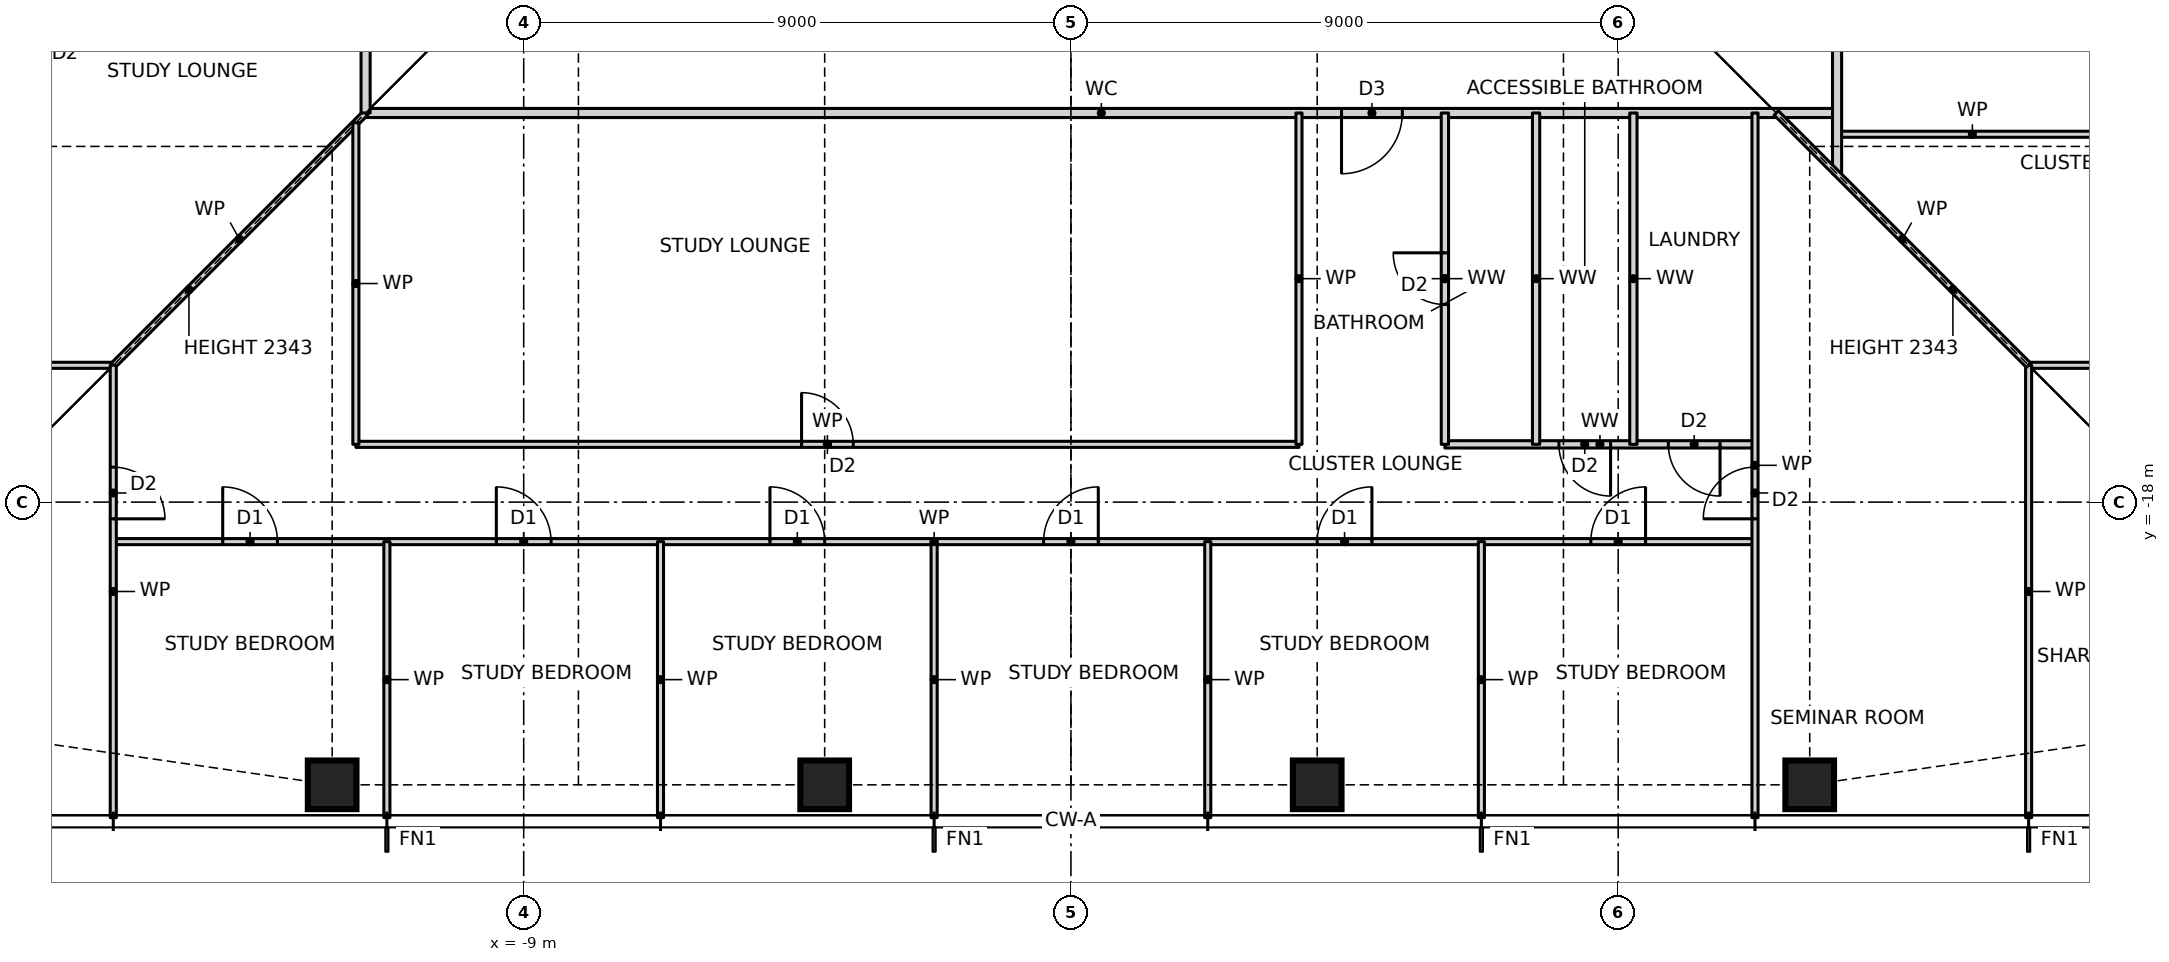
"""IFC4 building model, lengths in metres.
Left out: names, types, materials, properties, quantities, classifications, styles, units other than length and angle.
Written with IfcOpenShell. Run it as: python <this file> out.ifc"""

import sys

from ifc_helpers import new_model, si_unit, direction, frame, frame_2d, origin, origin_2d, place, context, subcontext, project, spatial, rectangle, hollow_rectangle, extrude, element, fill, save


model = new_model("IFC4")
c1 = context("Model", 3, precision=1e-05, world=origin(), true_north=direction((0.0, 1.0)))
c2 = subcontext(c1, "Body", "Model", "MODEL_VIEW")
j1 = project(units=[si_unit("LENGTHUNIT", "METRE"), si_unit("PLANEANGLEUNIT", "RADIAN")], contexts=[c1])
p1 = place(None, origin())
s1 = spatial("IfcSite", under=j1, at=p1, CompositionType="ELEMENT")
p2 = place(p1, origin())
s2 = spatial("IfcBuilding", under=s1, at=p2, CompositionType="ELEMENT")
p3 = place(p2, frame((0.0, 0.0, 29.0)))
s3 = spatial("IfcBuildingStorey", under=s2, at=p3, CompositionType="ELEMENT", Elevation=29.0)
for number, where, z_axis, x_axis in (
    (1, (-12.15, -22.65, 0.0), (0.0, 0.0, 1.0), (1.0, 0.0, 0.0)),
    (2, (-4.05, -22.65, 0.0), (0.0, 0.0, 1.0), (1.0, 0.0, 0.0)),
    (3, (4.05, -22.65, 0.0), (0.0, 0.0, 1.0), (1.0, 0.0, 0.0)),
    (4, (12.15, -22.65, 0.0), (0.0, 0.0, 1.0), (1.0, 0.0, 0.0)),
):
    element("IfcColumn", number, at=place(p3, frame(where, z_axis=z_axis, x_axis=x_axis)), inside=s3, PredefinedType="COLUMN", context=c2, shape_type="SweptSolid", body=[
        extrude(hollow_rectangle(XDim=0.8, YDim=0.8, WallThickness=0.09, at=origin_2d()), origin(), (0.0, 0.0, 1.0), 3.5),
    ])
p4 = place(p3, frame((-15.75, -18.65, 0.0), z_axis=(0.0, 0.0, 1.0), x_axis=(1.0, 0.0, 0.0)))
e5 = element("IfcWall", 5, at=p4, inside=s3, PredefinedType="PARTITIONING", context=c2, shape_type="SweptSolid", body=[
    extrude(rectangle(XDim=27.0, YDim=0.1, at=frame_2d((13.5, 0.0))), origin(), (0.0, 0.0, 1.0), 3.27),
])
p5 = place(p4, frame((1.8, 0.0, 0.0)))
e6 = element("IfcOpeningElement", 6, at=p5, cuts=e5, PredefinedType="OPENING", context=c2, shape_type="SweptSolid", body=[
    extrude(rectangle(XDim=0.9, YDim=2.1, at=frame_2d((0.45, 1.05))), frame((0.0, 0.06, 0.0), z_axis=(0.0, -1.0, 0.0), x_axis=(1.0, 0.0, 0.0)), (0.0, 0.0, 1.0), 0.12),
])
p6 = place(p4, frame((6.3, 0.0, 0.0)))
e7 = element("IfcOpeningElement", 7, at=p6, cuts=e5, PredefinedType="OPENING", context=c2, shape_type="SweptSolid", body=[
    extrude(rectangle(XDim=0.9, YDim=2.1, at=frame_2d((0.45, 1.05))), frame((0.0, 0.06, 0.0), z_axis=(0.0, -1.0, 0.0), x_axis=(1.0, 0.0, 0.0)), (0.0, 0.0, 1.0), 0.12),
])
p7 = place(p4, frame((10.8, 0.0, 0.0)))
e8 = element("IfcOpeningElement", 8, at=p7, cuts=e5, PredefinedType="OPENING", context=c2, shape_type="SweptSolid", body=[
    extrude(rectangle(XDim=0.9, YDim=2.1, at=frame_2d((0.45, 1.05))), frame((0.0, 0.06, 0.0), z_axis=(0.0, -1.0, 0.0), x_axis=(1.0, 0.0, 0.0)), (0.0, 0.0, 1.0), 0.12),
])
p8 = place(p4, frame((15.3, 0.0, 0.0)))
e9 = element("IfcOpeningElement", 9, at=p8, cuts=e5, PredefinedType="OPENING", context=c2, shape_type="SweptSolid", body=[
    extrude(rectangle(XDim=0.9, YDim=2.1, at=frame_2d((0.45, 1.05))), frame((0.0, 0.06, 0.0), z_axis=(0.0, -1.0, 0.0), x_axis=(1.0, 0.0, 0.0)), (0.0, 0.0, 1.0), 0.12),
])
p9 = place(p4, frame((19.8, 0.0, 0.0)))
e10 = element("IfcOpeningElement", 10, at=p9, cuts=e5, PredefinedType="OPENING", context=c2, shape_type="SweptSolid", body=[
    extrude(rectangle(XDim=0.9, YDim=2.1, at=frame_2d((0.45, 1.05))), frame((0.0, 0.06, 0.0), z_axis=(0.0, -1.0, 0.0), x_axis=(1.0, 0.0, 0.0)), (0.0, 0.0, 1.0), 0.12),
])
p10 = place(p4, frame((24.3, 0.0, 0.0)))
e11 = element("IfcOpeningElement", 11, at=p10, cuts=e5, PredefinedType="OPENING", context=c2, shape_type="SweptSolid", body=[
    extrude(rectangle(XDim=0.9, YDim=2.1, at=frame_2d((0.45, 1.05))), frame((0.0, 0.06, 0.0), z_axis=(0.0, -1.0, 0.0), x_axis=(1.0, 0.0, 0.0)), (0.0, 0.0, 1.0), 0.12),
])
p11 = place(p3, frame((-11.76, -17.05, 0.0), z_axis=(0.0, 0.0, 1.0), x_axis=(1.0, 0.0, 0.0)))
e12 = element("IfcWall", 12, at=p11, inside=s3, PredefinedType="PARTITIONING", context=c2, shape_type="SweptSolid", body=[
    extrude(rectangle(XDim=15.51, YDim=0.1, at=frame_2d((7.755, 0.0))), origin(), (0.0, 0.0, 1.0), 3.27),
])
p12 = place(p11, frame((7.33, 0.0, 0.0)))
e13 = element("IfcOpeningElement", 13, at=p12, cuts=e12, PredefinedType="OPENING", context=c2, shape_type="SweptSolid", body=[
    extrude(rectangle(XDim=0.85, YDim=2.1, at=frame_2d((0.425, 1.05))), frame((0.0, 0.06, 0.0), z_axis=(0.0, -1.0, 0.0), x_axis=(1.0, 0.0, 0.0)), (0.0, 0.0, 1.0), 0.12),
])
p13 = place(p3, frame((6.15, -17.05, 0.0), z_axis=(0.0, 0.0, 1.0), x_axis=(1.0, 0.0, 0.0)))
e14 = element("IfcWall", 14, at=p13, inside=s3, PredefinedType="PARTITIONING", context=c2, shape_type="SweptSolid", body=[
    extrude(rectangle(XDim=5.1, YDim=0.12, at=frame_2d((2.55, 0.0))), origin(), (0.0, 0.0, 1.0), 3.27),
])
p14 = place(p13, frame((1.875, 0.0, 0.0)))
e15 = element("IfcOpeningElement", 15, at=p14, cuts=e14, PredefinedType="OPENING", context=c2, shape_type="SweptSolid", body=[
    extrude(rectangle(XDim=0.85, YDim=2.1, at=frame_2d((0.425, 1.05))), frame((0.0, 0.07, 0.0), z_axis=(0.0, -1.0, 0.0), x_axis=(1.0, 0.0, 0.0)), (0.0, 0.0, 1.0), 0.14),
])
p15 = place(p13, frame((3.675, 0.0, 0.0)))
e16 = element("IfcOpeningElement", 16, at=p15, cuts=e14, PredefinedType="OPENING", context=c2, shape_type="SweptSolid", body=[
    extrude(rectangle(XDim=0.85, YDim=2.1, at=frame_2d((0.425, 1.05))), frame((0.0, 0.07, 0.0), z_axis=(0.0, -1.0, 0.0), x_axis=(1.0, 0.0, 0.0)), (0.0, 0.0, 1.0), 0.14),
])
p16 = place(p3, frame((-23.19, -15.75, 0.0), z_axis=(0.0, 0.0, 1.0), x_axis=(1.0, 0.0, 0.0)))
e17 = element("IfcWall", 17, at=p16, inside=s3, PredefinedType="PARTITIONING", context=c2, shape_type="SweptSolid", body=[
    extrude(rectangle(XDim=7.44, YDim=0.1, at=frame_2d((3.72, 0.0))), origin(), (0.0, 0.0, 1.0), 3.27),
])
p17 = place(p3, frame((15.75, -15.75, 0.0), z_axis=(0.0, 0.0, 1.0), x_axis=(1.0, 0.0, 0.0)))
e18 = element("IfcWall", 18, at=p17, inside=s3, PredefinedType="PARTITIONING", context=c2, shape_type="SweptSolid", body=[
    extrude(rectangle(XDim=7.44, YDim=0.1, at=frame_2d((3.72, 0.0))), origin(), (0.0, 0.0, 1.0), 3.27),
])
p18 = place(p17, frame((1.675, 0.0, 0.0)))
e19 = element("IfcOpeningElement", 19, at=p18, cuts=e18, PredefinedType="OPENING", context=c2, shape_type="SweptSolid", body=[
    extrude(rectangle(XDim=0.85, YDim=2.1, at=frame_2d((0.425, 1.05))), frame((0.0, 0.06, 0.0), z_axis=(0.0, -1.0, 0.0), x_axis=(1.0, 0.0, 0.0)), (0.0, 0.0, 1.0), 0.12),
])
p19 = place(p3, frame((12.6, -11.95, 0.0), z_axis=(0.0, 0.0, 1.0), x_axis=(1.0, 0.0, 0.0)))
e20 = element("IfcWall", 20, at=p19, inside=s3, PredefinedType="PARTITIONING", context=c2, shape_type="SweptSolid", body=[
    extrude(rectangle(XDim=4.45, YDim=0.1, at=frame_2d((2.225, 0.0))), origin(), (0.0, 0.0, 1.0), 3.27),
])
p20 = place(p3, frame((-11.6, -11.6, 0.0), z_axis=(0.0, 0.0, 1.0), x_axis=(1.0, 0.0, 0.0)))
e21 = element("IfcWall", 21, at=p20, inside=s3, PredefinedType="PARTITIONING", context=c2, shape_type="SweptSolid", body=[
    extrude(rectangle(XDim=24.2, YDim=0.15, at=frame_2d((12.1, 0.0))), origin(), (0.0, 0.0, 1.0), 3.27),
])
p21 = place(p20, frame((16.05, 0.0, 0.0)))
e22 = element("IfcOpeningElement", 22, at=p21, cuts=e21, PredefinedType="OPENING", context=c2, shape_type="SweptSolid", body=[
    extrude(rectangle(XDim=1.0, YDim=2.1, at=frame_2d((0.5, 1.05))), frame((0.0, 0.085, 0.0), z_axis=(0.0, -1.0, 0.0), x_axis=(1.0, 0.0, 0.0)), (0.0, 0.0, 1.0), 0.17),
])
p22 = place(p3, frame((-15.75, -15.75, 0.0), z_axis=(0.0, 0.0, 1.0), x_axis=(0.707106781187, 0.707106781187, 0.0)))
e23 = element("IfcWall", 23, at=p22, inside=s3, PredefinedType="PARTITIONING", context=c2, shape_type="SweptSolid", body=[
    extrude(rectangle(XDim=5.869, YDim=0.1, at=frame_2d((2.935, 0.0))), origin(), (0.0, 0.0, 1.0), 2.343),
])
p23 = place(p3, frame((15.75, -23.19, 0.0), z_axis=(0.0, 0.0, 1.0), x_axis=(0.0, 1.0, 0.0)))
e24 = element("IfcWall", 24, at=p23, inside=s3, PredefinedType="PARTITIONING", context=c2, shape_type="SweptSolid", body=[
    extrude(rectangle(XDim=7.44, YDim=0.1, at=frame_2d((3.72, 0.0))), origin(), (0.0, 0.0, 1.0), 3.27),
])
p24 = place(p3, frame((12.6, -12.6, 0.0), z_axis=(0.0, 0.0, 1.0), x_axis=(0.0, 1.0, 0.0)))
e25 = element("IfcWall", 25, at=p24, inside=s3, PredefinedType="PARTITIONING", context=c2, shape_type="SweptSolid", body=[
    extrude(rectangle(XDim=25.2, YDim=0.15, at=frame_2d((12.6, 0.0))), origin(), (0.0, 0.0, 1.0), 3.27),
])
p25 = place(p24, frame((21.55, 0.0, 0.0)))
e26 = element("IfcOpeningElement", 26, at=p25, cuts=e25, PredefinedType="OPENING", context=c2, shape_type="SweptSolid", body=[
    extrude(rectangle(XDim=1.0, YDim=2.1, at=frame_2d((0.5, 1.05))), frame((0.0, 0.085, 0.0), z_axis=(0.0, -1.0, 0.0), x_axis=(1.0, 0.0, 0.0)), (0.0, 0.0, 1.0), 0.17),
])
p26 = place(p3, frame((11.25, -23.19, 0.0), z_axis=(0.0, 0.0, 1.0), x_axis=(0.0, 1.0, 0.0)))
e27 = element("IfcWall", 27, at=p26, inside=s3, PredefinedType="PARTITIONING", context=c2, shape_type="SweptSolid", body=[
    extrude(rectangle(XDim=11.59, YDim=0.1, at=frame_2d((5.795, 0.0))), origin(), (0.0, 0.0, 1.0), 3.27),
])
p27 = place(p26, frame((4.915, 0.0, 0.0)))
e28 = element("IfcOpeningElement", 28, at=p27, cuts=e27, PredefinedType="OPENING", context=c2, shape_type="SweptSolid", body=[
    extrude(rectangle(XDim=0.85, YDim=2.1, at=frame_2d((0.425, 1.05))), frame((0.0, 0.06, 0.0), z_axis=(0.0, -1.0, 0.0), x_axis=(1.0, 0.0, 0.0)), (0.0, 0.0, 1.0), 0.12),
])
for number, where, z_axis, x_axis in (
    (29, (9.25, -17.05, 0.0), (0.0, 0.0, 1.0), (0.0, 1.0, 0.0)),
    (30, (7.65, -17.05, 0.0), (0.0, 0.0, 1.0), (0.0, 1.0, 0.0)),
):
    element("IfcWall", number, at=place(p3, frame(where, z_axis=z_axis, x_axis=x_axis)), inside=s3, PredefinedType="PARTITIONING", context=c2, shape_type="SweptSolid", body=[
        extrude(rectangle(XDim=5.45, YDim=0.12, at=frame_2d((2.725, 0.0))), origin(), (0.0, 0.0, 1.0), 3.27),
    ])
p28 = place(p3, frame((6.75, -23.19, 0.0), z_axis=(0.0, 0.0, 1.0), x_axis=(0.0, 1.0, 0.0)))
e31 = element("IfcWall", 31, at=p28, inside=s3, PredefinedType="PARTITIONING", context=c2, shape_type="SweptSolid", body=[
    extrude(rectangle(XDim=4.54, YDim=0.1, at=frame_2d((2.27, 0.0))), origin(), (0.0, 0.0, 1.0), 3.27),
])
p29 = place(p3, frame((6.15, -17.05, 0.0), z_axis=(0.0, 0.0, 1.0), x_axis=(0.0, 1.0, 0.0)))
e32 = element("IfcWall", 32, at=p29, inside=s3, PredefinedType="PARTITIONING", context=c2, shape_type="SweptSolid", body=[
    extrude(rectangle(XDim=5.45, YDim=0.12, at=frame_2d((2.725, 0.0))), origin(), (0.0, 0.0, 1.0), 3.27),
])
p30 = place(p29, frame((2.3, 0.0, 0.0)))
e33 = element("IfcOpeningElement", 33, at=p30, cuts=e32, PredefinedType="OPENING", context=c2, shape_type="SweptSolid", body=[
    extrude(rectangle(XDim=0.85, YDim=2.1, at=frame_2d((0.425, 1.05))), frame((0.0, 0.07, 0.0), z_axis=(0.0, -1.0, 0.0), x_axis=(1.0, 0.0, 0.0)), (0.0, 0.0, 1.0), 0.14),
])
p31 = place(p3, frame((3.75, -17.05, 0.0), z_axis=(0.0, 0.0, 1.0), x_axis=(0.0, 1.0, 0.0)))
e34 = element("IfcWall", 34, at=p31, inside=s3, PredefinedType="PARTITIONING", context=c2, shape_type="SweptSolid", body=[
    extrude(rectangle(XDim=5.45, YDim=0.1, at=frame_2d((2.725, 0.0))), origin(), (0.0, 0.0, 1.0), 3.27),
])
for number, where, z_axis, x_axis in (
    (35, (2.25, -23.19, 0.0), (0.0, 0.0, 1.0), (0.0, 1.0, 0.0)),
    (36, (-2.25, -23.19, 0.0), (0.0, 0.0, 1.0), (0.0, 1.0, 0.0)),
    (37, (-6.75, -23.19, 0.0), (0.0, 0.0, 1.0), (0.0, 1.0, 0.0)),
    (38, (-11.25, -23.19, 0.0), (0.0, 0.0, 1.0), (0.0, 1.0, 0.0)),
):
    element("IfcWall", number, at=place(p3, frame(where, z_axis=z_axis, x_axis=x_axis)), inside=s3, PredefinedType="PARTITIONING", context=c2, shape_type="SweptSolid", body=[
        extrude(rectangle(XDim=4.54, YDim=0.1, at=frame_2d((2.27, 0.0))), origin(), (0.0, 0.0, 1.0), 3.27),
    ])
p32 = place(p3, frame((-11.6, -11.6, 0.0), z_axis=(0.0, 0.0, 1.0), x_axis=(0.0, 1.0, 0.0)))
e39 = element("IfcWall", 39, at=p32, inside=s3, PredefinedType="PARTITIONING", context=c2, shape_type="SweptSolid", body=[
    extrude(rectangle(XDim=23.2, YDim=0.15, at=frame_2d((11.6, 0.0))), origin(), (0.0, 0.0, 1.0), 3.27),
])
p33 = place(p32, frame((20.55, 0.0, 0.0)))
e40 = element("IfcOpeningElement", 40, at=p33, cuts=e39, PredefinedType="OPENING", context=c2, shape_type="SweptSolid", body=[
    extrude(rectangle(XDim=1.0, YDim=2.1, at=frame_2d((0.5, 1.05))), frame((0.0, 0.085, 0.0), z_axis=(0.0, -1.0, 0.0), x_axis=(1.0, 0.0, 0.0)), (0.0, 0.0, 1.0), 0.17),
])
p34 = place(p32, frame((18.5, 0.0, 0.0)))
e41 = element("IfcOpeningElement", 41, at=p34, cuts=e39, PredefinedType="OPENING", context=c2, shape_type="SweptSolid", body=[
    extrude(rectangle(XDim=0.9, YDim=2.1, at=frame_2d((0.45, 1.05))), frame((0.0, 0.085, 0.0), z_axis=(0.0, -1.0, 0.0), x_axis=(1.0, 0.0, 0.0)), (0.0, 0.0, 1.0), 0.17),
])
p35 = place(p3, frame((-11.76, -17.05, 0.0), z_axis=(0.0, 0.0, 1.0), x_axis=(0.0, 1.0, 0.0)))
e42 = element("IfcWall", 42, at=p35, inside=s3, PredefinedType="PARTITIONING", context=c2, shape_type="SweptSolid", body=[
    extrude(rectangle(XDim=5.29, YDim=0.1, at=frame_2d((2.645, 0.0))), origin(), (0.0, 0.0, 1.0), 3.27),
])
p36 = place(p3, frame((-15.75, -23.19, 0.0), z_axis=(0.0, 0.0, 1.0), x_axis=(0.0, 1.0, 0.0)))
e43 = element("IfcWall", 43, at=p36, inside=s3, PredefinedType="PARTITIONING", context=c2, shape_type="SweptSolid", body=[
    extrude(rectangle(XDim=7.44, YDim=0.1, at=frame_2d((3.72, 0.0))), origin(), (0.0, 0.0, 1.0), 3.27),
])
p37 = place(p36, frame((4.915, 0.0, 0.0)))
e44 = element("IfcOpeningElement", 44, at=p37, cuts=e43, PredefinedType="OPENING", context=c2, shape_type="SweptSolid", body=[
    extrude(rectangle(XDim=0.85, YDim=2.1, at=frame_2d((0.425, 1.05))), frame((0.0, 0.06, 0.0), z_axis=(0.0, -1.0, 0.0), x_axis=(1.0, 0.0, 0.0)), (0.0, 0.0, 1.0), 0.12),
])
p38 = place(p3, frame((15.75, -15.75, 0.0), z_axis=(0.0, 0.0, 1.0), x_axis=(-0.707106781187, 0.707106781187, 0.0)))
e45 = element("IfcWall", 45, at=p38, inside=s3, PredefinedType="PARTITIONING", context=c2, shape_type="SweptSolid", body=[
    extrude(rectangle(XDim=5.869, YDim=0.1, at=frame_2d((2.935, 0.0))), origin(), (0.0, 0.0, 1.0), 2.343),
])
p39 = place(p5, origin())
e46 = element("IfcDoor", 46, at=p39, inside=s3, OperationType="SINGLE_SWING_LEFT", PredefinedType="DOOR", context=c2, shape_type="SweptSolid", body=[
    extrude(rectangle(XDim=0.9, YDim=2.1, at=frame_2d((0.45, 1.05))), frame((0.0, 0.025, 0.0), z_axis=(0.0, -1.0, 0.0), x_axis=(1.0, 0.0, 0.0)), (0.0, 0.0, 1.0), 0.05),
])
fill(e6, e46)
p40 = place(p6, origin())
e47 = element("IfcDoor", 47, at=p40, inside=s3, OperationType="SINGLE_SWING_LEFT", PredefinedType="DOOR", context=c2, shape_type="SweptSolid", body=[
    extrude(rectangle(XDim=0.9, YDim=2.1, at=frame_2d((0.45, 1.05))), frame((0.0, 0.025, 0.0), z_axis=(0.0, -1.0, 0.0), x_axis=(1.0, 0.0, 0.0)), (0.0, 0.0, 1.0), 0.05),
])
fill(e7, e47)
p41 = place(p7, origin())
e48 = element("IfcDoor", 48, at=p41, inside=s3, OperationType="SINGLE_SWING_LEFT", PredefinedType="DOOR", context=c2, shape_type="SweptSolid", body=[
    extrude(rectangle(XDim=0.9, YDim=2.1, at=frame_2d((0.45, 1.05))), frame((0.0, 0.025, 0.0), z_axis=(0.0, -1.0, 0.0), x_axis=(1.0, 0.0, 0.0)), (0.0, 0.0, 1.0), 0.05),
])
fill(e8, e48)
p42 = place(p8, origin())
e49 = element("IfcDoor", 49, at=p42, inside=s3, OperationType="SINGLE_SWING_RIGHT", PredefinedType="DOOR", context=c2, shape_type="SweptSolid", body=[
    extrude(rectangle(XDim=0.9, YDim=2.1, at=frame_2d((0.45, 1.05))), frame((0.0, 0.025, 0.0), z_axis=(0.0, -1.0, 0.0), x_axis=(1.0, 0.0, 0.0)), (0.0, 0.0, 1.0), 0.05),
])
fill(e9, e49)
p43 = place(p9, origin())
e50 = element("IfcDoor", 50, at=p43, inside=s3, OperationType="SINGLE_SWING_RIGHT", PredefinedType="DOOR", context=c2, shape_type="SweptSolid", body=[
    extrude(rectangle(XDim=0.9, YDim=2.1, at=frame_2d((0.45, 1.05))), frame((0.0, 0.025, 0.0), z_axis=(0.0, -1.0, 0.0), x_axis=(1.0, 0.0, 0.0)), (0.0, 0.0, 1.0), 0.05),
])
fill(e10, e50)
p44 = place(p10, origin())
e51 = element("IfcDoor", 51, at=p44, inside=s3, OperationType="SINGLE_SWING_RIGHT", PredefinedType="DOOR", context=c2, shape_type="SweptSolid", body=[
    extrude(rectangle(XDim=0.9, YDim=2.1, at=frame_2d((0.45, 1.05))), frame((0.0, 0.025, 0.0), z_axis=(0.0, -1.0, 0.0), x_axis=(1.0, 0.0, 0.0)), (0.0, 0.0, 1.0), 0.05),
])
fill(e11, e51)
p45 = place(p21, frame((1.0, 0.0, 0.0), z_axis=(0.0, 0.0, 1.0), x_axis=(-1.0, 0.0, 0.0)))
e52 = element("IfcDoor", 52, at=p45, inside=s3, OperationType="SINGLE_SWING_RIGHT", PredefinedType="DOOR", context=c2, shape_type="SweptSolid", body=[
    extrude(rectangle(XDim=1.0, YDim=2.1, at=frame_2d((0.5, 1.05))), frame((0.0, 0.025, 0.0), z_axis=(0.0, -1.0, 0.0), x_axis=(1.0, 0.0, 0.0)), (0.0, 0.0, 1.0), 0.05),
])
fill(e22, e52)
p46 = place(p12, origin())
e53 = element("IfcDoor", 53, at=p46, inside=s3, OperationType="SINGLE_SWING_LEFT", PredefinedType="DOOR", context=c2, shape_type="SweptSolid", body=[
    extrude(rectangle(XDim=0.85, YDim=2.1, at=frame_2d((0.425, 1.05))), frame((0.0, 0.025, 0.0), z_axis=(0.0, -1.0, 0.0), x_axis=(1.0, 0.0, 0.0)), (0.0, 0.0, 1.0), 0.05),
])
fill(e13, e53)
p47 = place(p30, origin())
e54 = element("IfcDoor", 54, at=p47, inside=s3, OperationType="SINGLE_SWING_RIGHT", PredefinedType="DOOR", context=c2, shape_type="SweptSolid", body=[
    extrude(rectangle(XDim=0.85, YDim=2.1, at=frame_2d((0.425, 1.05))), frame((0.0, 0.025, 0.0), z_axis=(0.0, -1.0, 0.0), x_axis=(1.0, 0.0, 0.0)), (0.0, 0.0, 1.0), 0.05),
])
fill(e33, e54)
p48 = place(p14, frame((0.85, 0.0, 0.0), z_axis=(0.0, 0.0, 1.0), x_axis=(-1.0, 0.0, 0.0)))
e55 = element("IfcDoor", 55, at=p48, inside=s3, OperationType="SINGLE_SWING_LEFT", PredefinedType="DOOR", context=c2, shape_type="SweptSolid", body=[
    extrude(rectangle(XDim=0.85, YDim=2.1, at=frame_2d((0.425, 1.05))), frame((0.0, 0.025, 0.0), z_axis=(0.0, -1.0, 0.0), x_axis=(1.0, 0.0, 0.0)), (0.0, 0.0, 1.0), 0.05),
])
fill(e15, e55)
p49 = place(p15, frame((0.85, 0.0, 0.0), z_axis=(0.0, 0.0, 1.0), x_axis=(-1.0, 0.0, 0.0)))
e56 = element("IfcDoor", 56, at=p49, inside=s3, OperationType="SINGLE_SWING_LEFT", PredefinedType="DOOR", context=c2, shape_type="SweptSolid", body=[
    extrude(rectangle(XDim=0.85, YDim=2.1, at=frame_2d((0.425, 1.05))), frame((0.0, 0.025, 0.0), z_axis=(0.0, -1.0, 0.0), x_axis=(1.0, 0.0, 0.0)), (0.0, 0.0, 1.0), 0.05),
])
fill(e16, e56)
p50 = place(p27, origin())
e57 = element("IfcDoor", 57, at=p50, inside=s3, OperationType="SINGLE_SWING_LEFT", PredefinedType="DOOR", context=c2, shape_type="SweptSolid", body=[
    extrude(rectangle(XDim=0.85, YDim=2.1, at=frame_2d((0.425, 1.05))), frame((0.0, 0.025, 0.0), z_axis=(0.0, -1.0, 0.0), x_axis=(1.0, 0.0, 0.0)), (0.0, 0.0, 1.0), 0.05),
])
fill(e28, e57)
p51 = place(p37, frame((0.85, 0.0, 0.0), z_axis=(0.0, 0.0, 1.0), x_axis=(-1.0, 0.0, 0.0)))
e58 = element("IfcDoor", 58, at=p51, inside=s3, OperationType="SINGLE_SWING_RIGHT", PredefinedType="DOOR", context=c2, shape_type="SweptSolid", body=[
    extrude(rectangle(XDim=0.85, YDim=2.1, at=frame_2d((0.425, 1.05))), frame((0.0, 0.025, 0.0), z_axis=(0.0, -1.0, 0.0), x_axis=(1.0, 0.0, 0.0)), (0.0, 0.0, 1.0), 0.05),
])
fill(e44, e58)
save(model, sys.argv[1])
